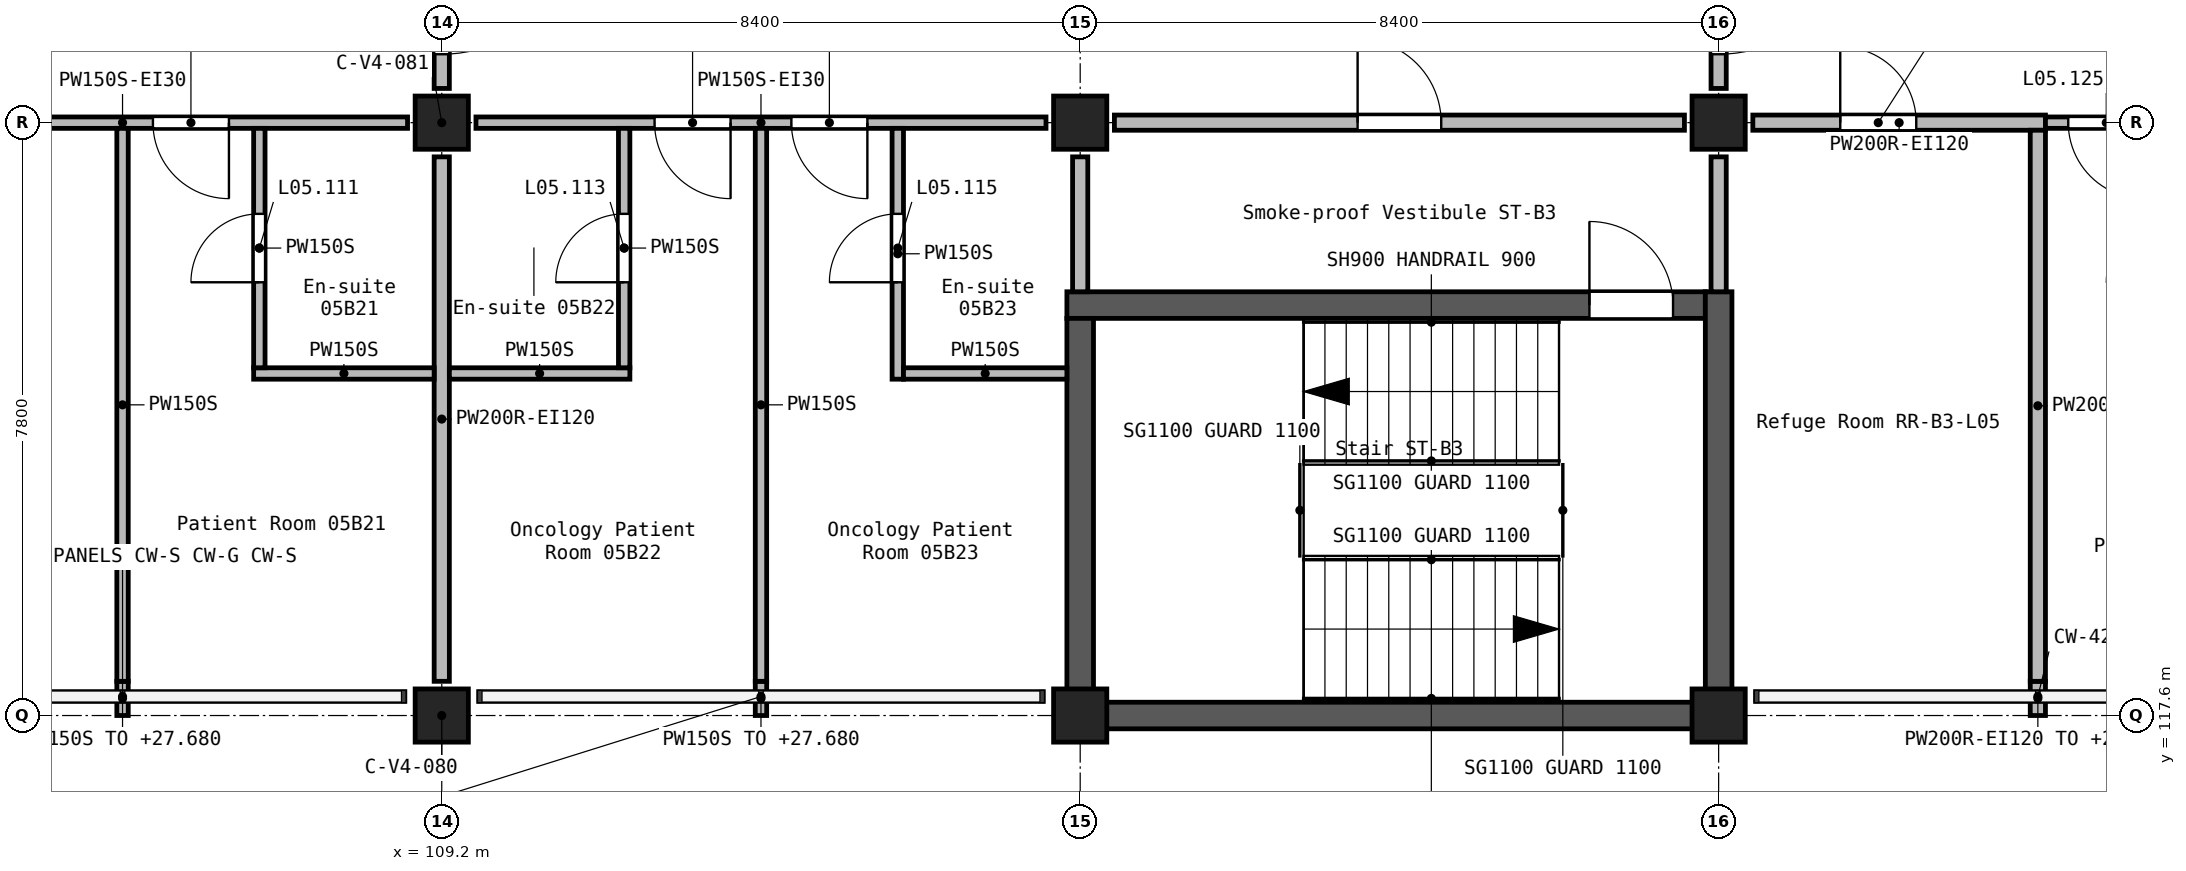
"""IFC4 building model, lengths in metres.
Left out: names, types, materials, properties, quantities, classifications, styles, units other than length and angle.
Written with IfcOpenShell. Run it as: python <this file> out.ifc"""

import sys

from ifc_helpers import new_model, si_unit, direction, frame, frame_2d, origin, origin_2d, place, context, subcontext, project, spatial, rectangle, extrude, element, fill, save


model = new_model("IFC4")
c1 = context("Model", 3, precision=1e-05, world=origin(), true_north=direction((0.0, 1.0)))
c2 = subcontext(c1, "Body", "Model", "MODEL_VIEW")
j1 = project(units=[si_unit("LENGTHUNIT", "METRE"), si_unit("PLANEANGLEUNIT", "RADIAN")], contexts=[c1])
p1 = place(None, origin())
s1 = spatial("IfcSite", under=j1, at=p1, CompositionType="ELEMENT")
p2 = place(p1, origin())
s2 = spatial("IfcBuilding", under=s1, at=p2, CompositionType="ELEMENT")
p3 = place(p2, frame((0.0, 0.0, 24.9)))
s3 = spatial("IfcBuildingStorey", under=s2, at=p3, CompositionType="ELEMENT", Elevation=24.9)
for number, where, z_axis, x_axis in (
    (1, (109.2, 117.6, 0.0), (0.0, 0.0, 1.0), (1.0, 0.0, 0.0)),
    (2, (109.2, 125.4, 0.0), (0.0, 0.0, 1.0), (1.0, 0.0, 0.0)),
    (3, (117.6, 117.6, 0.0), (0.0, 0.0, 1.0), (1.0, 0.0, 0.0)),
    (4, (117.6, 125.4, 0.0), (0.0, 0.0, 1.0), (1.0, 0.0, 0.0)),
    (5, (126.0, 117.6, 0.0), (0.0, 0.0, 1.0), (1.0, 0.0, 0.0)),
    (6, (126.0, 125.4, 0.0), (0.0, 0.0, 1.0), (1.0, 0.0, 0.0)),
):
    element("IfcColumn", number, at=place(p3, frame(where, z_axis=z_axis, x_axis=x_axis)), inside=s3, PredefinedType="COLUMN", context=c2, shape_type="SweptSolid", body=[
        extrude(rectangle(XDim=0.7, YDim=0.7, at=origin_2d()), origin(), (0.0, 0.0, 1.0), 3.9),
    ])
p4 = place(p3, frame((117.425, 123.0, 0.0), z_axis=(0.0, 0.0, 1.0), x_axis=(1.0, 0.0, 0.0)))
e7 = element("IfcWall", 7, at=p4, inside=s3, PredefinedType="SHEAR", context=c2, shape_type="SweptSolid", body=[
    extrude(rectangle(XDim=8.4, YDim=0.35, at=frame_2d((4.2, 0.0))), origin(), (0.0, 0.0, 1.0), 3.9),
])
p5 = place(p4, frame((6.875, 0.0, 0.0)))
e8 = element("IfcOpeningElement", 8, at=p5, cuts=e7, PredefinedType="OPENING", context=c2, shape_type="SweptSolid", body=[
    extrude(rectangle(XDim=1.1, YDim=2.1, at=frame_2d((0.55, 1.05))), frame((0.0, 0.185, 0.0), z_axis=(0.0, -1.0, 0.0), x_axis=(1.0, 0.0, 0.0)), (0.0, 0.0, 1.0), 0.37),
])
p6 = place(p3, frame((117.6, 117.425, 0.0), z_axis=(0.0, 0.0, 1.0), x_axis=(0.0, 1.0, 0.0)))
e9 = element("IfcWall", 9, at=p6, inside=s3, PredefinedType="SHEAR", context=c2, shape_type="SweptSolid", body=[
    extrude(rectangle(XDim=5.4, YDim=0.35, at=frame_2d((2.7, 0.0))), origin(), (0.0, 0.0, 1.0), 3.9),
])
p7 = place(p3, frame((117.775, 117.6, 0.0), z_axis=(0.0, 0.0, 1.0), x_axis=(1.0, 0.0, 0.0)))
e10 = element("IfcWall", 10, at=p7, inside=s3, PredefinedType="SHEAR", context=c2, shape_type="SweptSolid", body=[
    extrude(rectangle(XDim=8.05, YDim=0.35, at=frame_2d((4.025, 0.0))), origin(), (0.0, 0.0, 1.0), 3.9),
])
p8 = place(p3, frame((126.0, 117.425, 0.0), z_axis=(0.0, 0.0, 1.0), x_axis=(0.0, 1.0, 0.0)))
e11 = element("IfcWall", 11, at=p8, inside=s3, PredefinedType="SHEAR", context=c2, shape_type="SweptSolid", body=[
    extrude(rectangle(XDim=5.75, YDim=0.35, at=frame_2d((2.875, 0.0))), origin(), (0.0, 0.0, 1.0), 3.9),
])
p9 = place(p3, frame((109.2, 128.55, 0.0), z_axis=(0.0, 0.0, 1.0), x_axis=(0.0, -1.0, 0.0)))
e12 = element("IfcWall", 12, at=p9, inside=s3, PredefinedType="SOLIDWALL", context=c2, shape_type="SweptSolid", body=[
    extrude(rectangle(XDim=2.7, YDim=0.2, at=frame_2d((1.35, 0.0))), origin(), (0.0, 0.0, 1.0), 3.6),
])
p10 = place(p9, frame((0.45, 0.0, 0.0)))
e13 = element("IfcOpeningElement", 13, at=p10, cuts=e12, PredefinedType="OPENING", context=c2, shape_type="SweptSolid", body=[
    extrude(rectangle(XDim=1.8, YDim=2.1, at=frame_2d((0.9, 1.05))), frame((0.0, 0.11, 0.0), z_axis=(0.0, -1.0, 0.0), x_axis=(1.0, 0.0, 0.0)), (0.0, 0.0, 1.0), 0.22),
])
p11 = place(p3, frame((109.2, 124.95, 0.0), z_axis=(0.0, 0.0, 1.0), x_axis=(0.0, -1.0, 0.0)))
e14 = element("IfcWall", 14, at=p11, inside=s3, PredefinedType="SOLIDWALL", context=c2, shape_type="SweptSolid", body=[
    extrude(rectangle(XDim=6.9, YDim=0.2, at=frame_2d((3.45, 0.0))), origin(), (0.0, 0.0, 1.0), 3.6),
])
p12 = place(p3, frame((126.0, 128.55, 0.0), z_axis=(0.0, 0.0, 1.0), x_axis=(0.0, -1.0, 0.0)))
e15 = element("IfcWall", 15, at=p12, inside=s3, PredefinedType="SOLIDWALL", context=c2, shape_type="SweptSolid", body=[
    extrude(rectangle(XDim=2.7, YDim=0.2, at=frame_2d((1.35, 0.0))), origin(), (0.0, 0.0, 1.0), 3.6),
])
p13 = place(p12, frame((0.45, 0.0, 0.0)))
e16 = element("IfcOpeningElement", 16, at=p13, cuts=e15, PredefinedType="OPENING", context=c2, shape_type="SweptSolid", body=[
    extrude(rectangle(XDim=1.8, YDim=2.1, at=frame_2d((0.9, 1.05))), frame((0.0, 0.11, 0.0), z_axis=(0.0, -1.0, 0.0), x_axis=(1.0, 0.0, 0.0)), (0.0, 0.0, 1.0), 0.22),
])
p14 = place(p3, frame((126.0, 124.95, 0.0), z_axis=(0.0, 0.0, 1.0), x_axis=(0.0, -1.0, 0.0)))
e17 = element("IfcWall", 17, at=p14, inside=s3, PredefinedType="SOLIDWALL", context=c2, shape_type="SweptSolid", body=[
    extrude(rectangle(XDim=1.775, YDim=0.2, at=frame_2d((0.887, 0.0))), origin(), (0.0, 0.0, 1.0), 3.6),
])
p15 = place(p3, frame((118.05, 125.4, 0.0), z_axis=(0.0, 0.0, 1.0), x_axis=(1.0, 0.0, 0.0)))
e18 = element("IfcWall", 18, at=p15, inside=s3, PredefinedType="SOLIDWALL", context=c2, shape_type="SweptSolid", body=[
    extrude(rectangle(XDim=7.5, YDim=0.2, at=frame_2d((3.75, 0.0))), origin(), (0.0, 0.0, 1.0), 3.6),
])
p16 = place(p15, frame((3.2, 0.0, 0.0)))
e19 = element("IfcOpeningElement", 19, at=p16, cuts=e18, PredefinedType="OPENING", context=c2, shape_type="SweptSolid", body=[
    extrude(rectangle(XDim=1.1, YDim=2.1, at=frame_2d((0.55, 1.05))), frame((0.0, 0.11, 0.0), z_axis=(0.0, -1.0, 0.0), x_axis=(1.0, 0.0, 0.0)), (0.0, 0.0, 1.0), 0.22),
])
p17 = place(p3, frame((126.45, 125.4, 0.0), z_axis=(0.0, 0.0, 1.0), x_axis=(1.0, 0.0, 0.0)))
e20 = element("IfcWall", 20, at=p17, inside=s3, PredefinedType="SOLIDWALL", context=c2, shape_type="SweptSolid", body=[
    extrude(rectangle(XDim=3.85, YDim=0.2, at=frame_2d((1.925, 0.0))), origin(), (0.0, 0.0, 1.0), 3.6),
])
p18 = place(p17, frame((1.15, 0.0, 0.0)))
e21 = element("IfcOpeningElement", 21, at=p18, cuts=e20, PredefinedType="OPENING", context=c2, shape_type="SweptSolid", body=[
    extrude(rectangle(XDim=1.0, YDim=2.1, at=frame_2d((0.5, 1.05))), frame((0.0, 0.11, 0.0), z_axis=(0.0, -1.0, 0.0), x_axis=(1.0, 0.0, 0.0)), (0.0, 0.0, 1.0), 0.22),
])
p19 = place(p3, frame((130.2, 117.6, 0.0), z_axis=(0.0, 0.0, 1.0), x_axis=(0.0, 1.0, 0.0)))
e22 = element("IfcWall", 22, at=p19, inside=s3, PredefinedType="SOLIDWALL", context=c2, shape_type="SweptSolid", body=[
    extrude(rectangle(XDim=0.45, YDim=0.2, at=frame_2d((0.225, 0.0))), origin(), (0.0, 0.0, 1.0), 2.78),
])
p20 = place(p3, frame((130.2, 118.05, 0.0), z_axis=(0.0, 0.0, 1.0), x_axis=(0.0, 1.0, 0.0)))
e23 = element("IfcWall", 23, at=p20, inside=s3, PredefinedType="SOLIDWALL", context=c2, shape_type="SweptSolid", body=[
    extrude(rectangle(XDim=7.25, YDim=0.2, at=frame_2d((3.625, 0.0))), origin(), (0.0, 0.0, 1.0), 3.6),
])
p21 = place(p3, frame((117.6, 123.175, 0.0), z_axis=(0.0, 0.0, 1.0), x_axis=(0.0, 1.0, 0.0)))
e24 = element("IfcWall", 24, at=p21, inside=s3, PredefinedType="SOLIDWALL", context=c2, shape_type="SweptSolid", body=[
    extrude(rectangle(XDim=1.775, YDim=0.2, at=frame_2d((0.887, 0.0))), origin(), (0.0, 0.0, 1.0), 3.6),
])
p22 = place(p3, frame((117.15, 125.4, 0.0), z_axis=(0.0, 0.0, 1.0), x_axis=(-1.0, 0.0, 0.0)))
e25 = element("IfcWall", 25, at=p22, inside=s3, PredefinedType="PARTITIONING", context=c2, shape_type="SweptSolid", body=[
    extrude(rectangle(XDim=7.5, YDim=0.15, at=frame_2d((3.75, 0.0))), origin(), (0.0, 0.0, 1.0), 3.6),
])
p23 = place(p22, frame((4.15, 0.0, 0.0)))
e26 = element("IfcOpeningElement", 26, at=p23, cuts=e25, PredefinedType="OPENING", context=c2, shape_type="SweptSolid", body=[
    extrude(rectangle(XDim=1.0, YDim=2.1, at=frame_2d((0.5, 1.05))), frame((0.0, 0.085, 0.0), z_axis=(0.0, -1.0, 0.0), x_axis=(1.0, 0.0, 0.0)), (0.0, 0.0, 1.0), 0.17),
])
p24 = place(p22, frame((2.35, 0.0, 0.0)))
e27 = element("IfcOpeningElement", 27, at=p24, cuts=e25, PredefinedType="OPENING", context=c2, shape_type="SweptSolid", body=[
    extrude(rectangle(XDim=1.0, YDim=2.1, at=frame_2d((0.5, 1.05))), frame((0.0, 0.085, 0.0), z_axis=(0.0, -1.0, 0.0), x_axis=(1.0, 0.0, 0.0)), (0.0, 0.0, 1.0), 0.17),
])
p25 = place(p3, frame((108.75, 125.4, 0.0), z_axis=(0.0, 0.0, 1.0), x_axis=(-1.0, 0.0, 0.0)))
e28 = element("IfcWall", 28, at=p25, inside=s3, PredefinedType="PARTITIONING", context=c2, shape_type="SweptSolid", body=[
    extrude(rectangle(XDim=7.5, YDim=0.15, at=frame_2d((3.75, 0.0))), origin(), (0.0, 0.0, 1.0), 3.6),
])
p26 = place(p25, frame((6.1, 0.0, 0.0)))
e29 = element("IfcOpeningElement", 29, at=p26, cuts=e28, PredefinedType="OPENING", context=c2, shape_type="SweptSolid", body=[
    extrude(rectangle(XDim=1.0, YDim=2.1, at=frame_2d((0.5, 1.05))), frame((0.0, 0.085, 0.0), z_axis=(0.0, -1.0, 0.0), x_axis=(1.0, 0.0, 0.0)), (0.0, 0.0, 1.0), 0.17),
])
p27 = place(p25, frame((2.35, 0.0, 0.0)))
e30 = element("IfcOpeningElement", 30, at=p27, cuts=e28, PredefinedType="OPENING", context=c2, shape_type="SweptSolid", body=[
    extrude(rectangle(XDim=1.0, YDim=2.1, at=frame_2d((0.5, 1.05))), frame((0.0, 0.085, 0.0), z_axis=(0.0, -1.0, 0.0), x_axis=(1.0, 0.0, 0.0)), (0.0, 0.0, 1.0), 0.17),
])
p28 = place(p3, frame((133.95, 125.4, 0.0), z_axis=(0.0, 0.0, 1.0), x_axis=(-1.0, 0.0, 0.0)))
e31 = element("IfcWall", 31, at=p28, inside=s3, PredefinedType="PARTITIONING", context=c2, shape_type="SweptSolid", body=[
    extrude(rectangle(XDim=3.65, YDim=0.15, at=frame_2d((1.825, 0.0))), origin(), (0.0, 0.0, 1.0), 3.6),
])
p29 = place(p28, frame((2.35, 0.0, 0.0)))
e32 = element("IfcOpeningElement", 32, at=p29, cuts=e31, PredefinedType="OPENING", context=c2, shape_type="SweptSolid", body=[
    extrude(rectangle(XDim=1.0, YDim=2.1, at=frame_2d((0.5, 1.05))), frame((0.0, 0.085, 0.0), z_axis=(0.0, -1.0, 0.0), x_axis=(1.0, 0.0, 0.0)), (0.0, 0.0, 1.0), 0.17),
])
p30 = place(p3, frame((105.0, 117.6, 0.0), z_axis=(0.0, 0.0, 1.0), x_axis=(0.0, 1.0, 0.0)))
e33 = element("IfcWall", 33, at=p30, inside=s3, PredefinedType="PARTITIONING", context=c2, shape_type="SweptSolid", body=[
    extrude(rectangle(XDim=0.45, YDim=0.15, at=frame_2d((0.225, 0.0))), origin(), (0.0, 0.0, 1.0), 2.78),
])
p31 = place(p3, frame((105.0, 118.05, 0.0), z_axis=(0.0, 0.0, 1.0), x_axis=(0.0, 1.0, 0.0)))
e34 = element("IfcWall", 34, at=p31, inside=s3, PredefinedType="PARTITIONING", context=c2, shape_type="SweptSolid", body=[
    extrude(rectangle(XDim=7.275, YDim=0.15, at=frame_2d((3.637, 0.0))), origin(), (0.0, 0.0, 1.0), 3.6),
])
p32 = place(p3, frame((113.4, 117.6, 0.0), z_axis=(0.0, 0.0, 1.0), x_axis=(0.0, 1.0, 0.0)))
e35 = element("IfcWall", 35, at=p32, inside=s3, PredefinedType="PARTITIONING", context=c2, shape_type="SweptSolid", body=[
    extrude(rectangle(XDim=0.45, YDim=0.15, at=frame_2d((0.225, 0.0))), origin(), (0.0, 0.0, 1.0), 2.78),
])
p33 = place(p3, frame((113.4, 118.05, 0.0), z_axis=(0.0, 0.0, 1.0), x_axis=(0.0, 1.0, 0.0)))
e36 = element("IfcWall", 36, at=p33, inside=s3, PredefinedType="PARTITIONING", context=c2, shape_type="SweptSolid", body=[
    extrude(rectangle(XDim=7.275, YDim=0.15, at=frame_2d((3.637, 0.0))), origin(), (0.0, 0.0, 1.0), 3.6),
])
for number, where, z_axis, x_axis in (
    (37, (106.725, 122.1, 0.0), (0.0, 0.0, 1.0), (1.0, 0.0, 0.0)),
    (38, (109.3, 122.1, 0.0), (0.0, 0.0, 1.0), (1.0, 0.0, 0.0)),
):
    element("IfcWall", number, at=place(p3, frame(where, z_axis=z_axis, x_axis=x_axis)), inside=s3, PredefinedType="PARTITIONING", context=c2, shape_type="SweptSolid", body=[
        extrude(rectangle(XDim=2.375, YDim=0.15, at=frame_2d((1.188, 0.0))), origin(), (0.0, 0.0, 1.0), 3.6),
    ])
p34 = place(p3, frame((106.8, 122.175, 0.0), z_axis=(0.0, 0.0, 1.0), x_axis=(0.0, 1.0, 0.0)))
e39 = element("IfcWall", 39, at=p34, inside=s3, PredefinedType="PARTITIONING", context=c2, shape_type="SweptSolid", body=[
    extrude(rectangle(XDim=3.15, YDim=0.15, at=frame_2d((1.575, 0.0))), origin(), (0.0, 0.0, 1.0), 3.6),
])
p35 = place(p34, frame((1.125, 0.0, 0.0)))
e40 = element("IfcOpeningElement", 40, at=p35, cuts=e39, PredefinedType="OPENING", context=c2, shape_type="SweptSolid", body=[
    extrude(rectangle(XDim=0.9, YDim=2.1, at=frame_2d((0.45, 1.05))), frame((0.0, 0.085, 0.0), z_axis=(0.0, -1.0, 0.0), x_axis=(1.0, 0.0, 0.0)), (0.0, 0.0, 1.0), 0.17),
])
p36 = place(p3, frame((111.6, 122.175, 0.0), z_axis=(0.0, 0.0, 1.0), x_axis=(0.0, 1.0, 0.0)))
e41 = element("IfcWall", 41, at=p36, inside=s3, PredefinedType="PARTITIONING", context=c2, shape_type="SweptSolid", body=[
    extrude(rectangle(XDim=3.15, YDim=0.15, at=frame_2d((1.575, 0.0))), origin(), (0.0, 0.0, 1.0), 3.6),
])
p37 = place(p36, frame((1.125, 0.0, 0.0)))
e42 = element("IfcOpeningElement", 42, at=p37, cuts=e41, PredefinedType="OPENING", context=c2, shape_type="SweptSolid", body=[
    extrude(rectangle(XDim=0.9, YDim=2.1, at=frame_2d((0.45, 1.05))), frame((0.0, 0.085, 0.0), z_axis=(0.0, -1.0, 0.0), x_axis=(1.0, 0.0, 0.0)), (0.0, 0.0, 1.0), 0.17),
])
p38 = place(p3, frame((115.2, 122.025, 0.0), z_axis=(0.0, 0.0, 1.0), x_axis=(0.0, 1.0, 0.0)))
e43 = element("IfcWall", 43, at=p38, inside=s3, PredefinedType="PARTITIONING", context=c2, shape_type="SweptSolid", body=[
    extrude(rectangle(XDim=3.3, YDim=0.15, at=frame_2d((1.65, 0.0))), origin(), (0.0, 0.0, 1.0), 3.6),
])
p39 = place(p38, frame((1.275, 0.0, 0.0)))
e44 = element("IfcOpeningElement", 44, at=p39, cuts=e43, PredefinedType="OPENING", context=c2, shape_type="SweptSolid", body=[
    extrude(rectangle(XDim=0.9, YDim=2.1, at=frame_2d((0.45, 1.05))), frame((0.0, 0.085, 0.0), z_axis=(0.0, -1.0, 0.0), x_axis=(1.0, 0.0, 0.0)), (0.0, 0.0, 1.0), 0.17),
])
p40 = place(p3, frame((115.275, 122.1, 0.0), z_axis=(0.0, 0.0, 1.0), x_axis=(1.0, 0.0, 0.0)))
e45 = element("IfcWall", 45, at=p40, inside=s3, PredefinedType="PARTITIONING", context=c2, shape_type="SweptSolid", body=[
    extrude(rectangle(XDim=2.15, YDim=0.15, at=frame_2d((1.075, 0.0))), origin(), (0.0, 0.0, 1.0), 3.6),
])
p41 = place(p10, origin())
e46 = element("IfcDoor", 46, at=p41, inside=s3, OperationType="DOUBLE_DOOR_SINGLE_SWING", PredefinedType="DOOR", context=c2, shape_type="SweptSolid", body=[
    extrude(rectangle(XDim=1.8, YDim=2.1, at=frame_2d((0.9, 1.05))), frame((0.0, 0.025, 0.0), z_axis=(0.0, -1.0, 0.0), x_axis=(1.0, 0.0, 0.0)), (0.0, 0.0, 1.0), 0.05),
])
fill(e13, e46)
p42 = place(p13, origin())
e47 = element("IfcDoor", 47, at=p42, inside=s3, OperationType="DOUBLE_DOOR_SINGLE_SWING", PredefinedType="DOOR", context=c2, shape_type="SweptSolid", body=[
    extrude(rectangle(XDim=1.8, YDim=2.1, at=frame_2d((0.9, 1.05))), frame((0.0, 0.025, 0.0), z_axis=(0.0, -1.0, 0.0), x_axis=(1.0, 0.0, 0.0)), (0.0, 0.0, 1.0), 0.05),
])
fill(e16, e47)
p43 = place(p27, origin())
e48 = element("IfcDoor", 48, at=p43, inside=s3, OperationType="SINGLE_SWING_LEFT", PredefinedType="DOOR", context=c2, shape_type="SweptSolid", body=[
    extrude(rectangle(XDim=1.0, YDim=2.1, at=frame_2d((0.5, 1.05))), frame((0.0, 0.025, 0.0), z_axis=(0.0, -1.0, 0.0), x_axis=(1.0, 0.0, 0.0)), (0.0, 0.0, 1.0), 0.05),
])
fill(e30, e48)
p44 = place(p35, frame((0.9, 0.0, 0.0), z_axis=(0.0, 0.0, 1.0), x_axis=(-1.0, 0.0, 0.0)))
e49 = element("IfcDoor", 49, at=p44, inside=s3, OperationType="SINGLE_SWING_LEFT", PredefinedType="DOOR", context=c2, shape_type="SweptSolid", body=[
    extrude(rectangle(XDim=0.9, YDim=2.1, at=frame_2d((0.45, 1.05))), frame((0.0, 0.025, 0.0), z_axis=(0.0, -1.0, 0.0), x_axis=(1.0, 0.0, 0.0)), (0.0, 0.0, 1.0), 0.05),
])
fill(e40, e49)
p45 = place(p23, origin())
e50 = element("IfcDoor", 50, at=p45, inside=s3, OperationType="SINGLE_SWING_RIGHT", PredefinedType="DOOR", context=c2, shape_type="SweptSolid", body=[
    extrude(rectangle(XDim=1.0, YDim=2.1, at=frame_2d((0.5, 1.05))), frame((0.0, 0.025, 0.0), z_axis=(0.0, -1.0, 0.0), x_axis=(1.0, 0.0, 0.0)), (0.0, 0.0, 1.0), 0.05),
])
fill(e26, e50)
p46 = place(p37, origin())
e51 = element("IfcDoor", 51, at=p46, inside=s3, OperationType="SINGLE_SWING_RIGHT", PredefinedType="DOOR", context=c2, shape_type="SweptSolid", body=[
    extrude(rectangle(XDim=0.9, YDim=2.1, at=frame_2d((0.45, 1.05))), frame((0.0, 0.025, 0.0), z_axis=(0.0, -1.0, 0.0), x_axis=(1.0, 0.0, 0.0)), (0.0, 0.0, 1.0), 0.05),
])
fill(e42, e51)
p47 = place(p24, origin())
e52 = element("IfcDoor", 52, at=p47, inside=s3, OperationType="SINGLE_SWING_LEFT", PredefinedType="DOOR", context=c2, shape_type="SweptSolid", body=[
    extrude(rectangle(XDim=1.0, YDim=2.1, at=frame_2d((0.5, 1.05))), frame((0.0, 0.025, 0.0), z_axis=(0.0, -1.0, 0.0), x_axis=(1.0, 0.0, 0.0)), (0.0, 0.0, 1.0), 0.05),
])
fill(e27, e52)
p48 = place(p39, frame((0.9, 0.0, 0.0), z_axis=(0.0, 0.0, 1.0), x_axis=(-1.0, 0.0, 0.0)))
e53 = element("IfcDoor", 53, at=p48, inside=s3, OperationType="SINGLE_SWING_LEFT", PredefinedType="DOOR", context=c2, shape_type="SweptSolid", body=[
    extrude(rectangle(XDim=0.9, YDim=2.1, at=frame_2d((0.45, 1.05))), frame((0.0, 0.025, 0.0), z_axis=(0.0, -1.0, 0.0), x_axis=(1.0, 0.0, 0.0)), (0.0, 0.0, 1.0), 0.05),
])
fill(e44, e53)
p49 = place(p29, origin())
e54 = element("IfcDoor", 54, at=p49, inside=s3, OperationType="SINGLE_SWING_RIGHT", PredefinedType="DOOR", context=c2, shape_type="SweptSolid", body=[
    extrude(rectangle(XDim=1.0, YDim=2.1, at=frame_2d((0.5, 1.05))), frame((0.0, 0.025, 0.0), z_axis=(0.0, -1.0, 0.0), x_axis=(1.0, 0.0, 0.0)), (0.0, 0.0, 1.0), 0.05),
])
fill(e32, e54)
p50 = place(p18, frame((1.0, 0.0, 0.0), z_axis=(0.0, 0.0, 1.0), x_axis=(-1.0, 0.0, 0.0)))
e55 = element("IfcDoor", 55, at=p50, inside=s3, OperationType="SINGLE_SWING_RIGHT", PredefinedType="DOOR", context=c2, shape_type="SweptSolid", body=[
    extrude(rectangle(XDim=1.0, YDim=2.1, at=frame_2d((0.5, 1.05))), frame((0.0, 0.025, 0.0), z_axis=(0.0, -1.0, 0.0), x_axis=(1.0, 0.0, 0.0)), (0.0, 0.0, 1.0), 0.05),
])
fill(e21, e55)
p51 = place(p5, frame((1.1, 0.0, 0.0), z_axis=(0.0, 0.0, 1.0), x_axis=(-1.0, 0.0, 0.0)))
e56 = element("IfcDoor", 56, at=p51, inside=s3, OperationType="SINGLE_SWING_LEFT", PredefinedType="DOOR", context=c2, shape_type="SweptSolid", body=[
    extrude(rectangle(XDim=1.1, YDim=2.1, at=frame_2d((0.55, 1.05))), frame((0.0, 0.025, 0.0), z_axis=(0.0, -1.0, 0.0), x_axis=(1.0, 0.0, 0.0)), (0.0, 0.0, 1.0), 0.05),
])
fill(e8, e56)
p52 = place(p16, frame((1.1, 0.0, 0.0), z_axis=(0.0, 0.0, 1.0), x_axis=(-1.0, 0.0, 0.0)))
e57 = element("IfcDoor", 57, at=p52, inside=s3, OperationType="SINGLE_SWING_LEFT", PredefinedType="DOOR", context=c2, shape_type="SweptSolid", body=[
    extrude(rectangle(XDim=1.1, YDim=2.1, at=frame_2d((0.55, 1.05))), frame((0.0, 0.025, 0.0), z_axis=(0.0, -1.0, 0.0), x_axis=(1.0, 0.0, 0.0)), (0.0, 0.0, 1.0), 0.05),
])
fill(e19, e57)
save(model, sys.argv[1])
